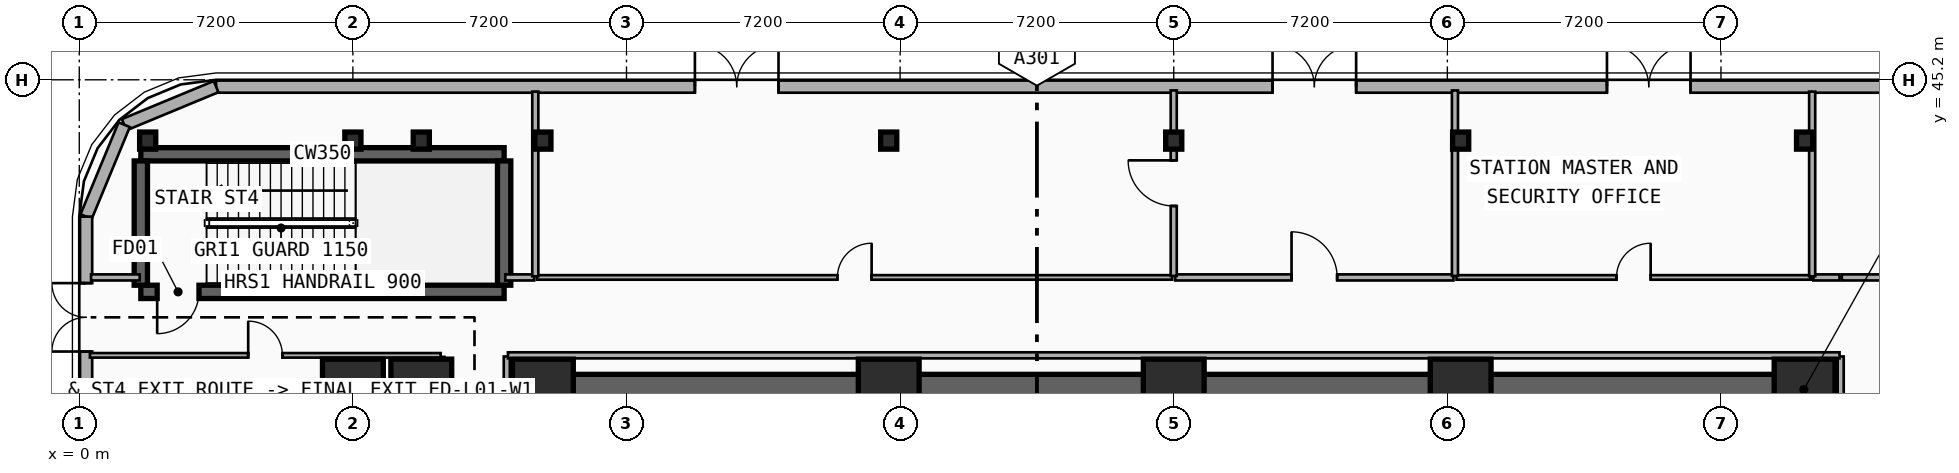
"""IFC4 building model, lengths in metres.
Left out: names, types, materials, properties, quantities, classifications, styles, units other than length and angle.
Written with IfcOpenShell. Run it as: python <this file> out.ifc"""

import sys

from ifc_helpers import new_model, si_unit, direction, frame, frame_2d, origin, origin_2d, place, context, subcontext, project, spatial, rectangle, i_section, extrude, element, fill, save


model = new_model("IFC4")
c1 = context("Model", 3, precision=1e-05, world=origin(), true_north=direction((0.0, 1.0)))
c2 = subcontext(c1, "Body", "Model", "MODEL_VIEW")
j1 = project(units=[si_unit("LENGTHUNIT", "METRE"), si_unit("PLANEANGLEUNIT", "RADIAN")], contexts=[c1])
p1 = place(None, origin())
s1 = spatial("IfcSite", under=j1, at=p1, CompositionType="ELEMENT")
p2 = place(p1, origin())
s2 = spatial("IfcBuilding", under=s1, at=p2, CompositionType="ELEMENT")
p3 = place(p2, origin())
s3 = spatial("IfcBuildingStorey", under=s2, at=p3, CompositionType="ELEMENT", Elevation=0.0)
p4 = place(p3, frame((12.15, 37.05, 0.0), z_axis=(0.0, 0.0, 1.0), x_axis=(1.0, 0.0, 0.0)))
e1 = element("IfcWall", 1, at=p4, inside=s3, PredefinedType="SHEAR", context=c2, shape_type="SweptSolid", body=[
    extrude(rectangle(XDim=33.23, YDim=0.8, at=frame_2d((16.615, 0.0))), origin(), (0.0, 0.0, 1.0), 5.4),
])
p5 = place(p3, frame((1.62, 43.24, 0.0), z_axis=(0.0, 0.0, 1.0), x_axis=(1.0, 0.0, 0.0)))
e2 = element("IfcWall", 2, at=p5, inside=s3, PredefinedType="SHEAR", context=c2, shape_type="SweptSolid", body=[
    extrude(rectangle(XDim=9.56, YDim=0.35, at=frame_2d((4.78, 0.0))), origin(), (0.0, 0.0, 1.0), 5.4),
])
p6 = place(p3, frame((11.18, 39.62, 0.0), z_axis=(0.0, 0.0, 1.0), x_axis=(-1.0, 0.0, 0.0)))
e3 = element("IfcWall", 3, at=p6, inside=s3, PredefinedType="SHEAR", context=c2, shape_type="SweptSolid", body=[
    extrude(rectangle(XDim=9.56, YDim=0.35, at=frame_2d((4.78, 0.0))), origin(), (0.0, 0.0, 1.0), 5.4),
])
p7 = place(p6, frame((8.03, 0.0, 0.0)))
e4 = element("IfcOpeningElement", 4, at=p7, cuts=e3, PredefinedType="OPENING", context=c2, shape_type="SweptSolid", body=[
    extrude(rectangle(XDim=1.1, YDim=2.15, at=frame_2d((0.55, 1.075))), frame((0.0, 0.185, 0.0), z_axis=(0.0, -1.0, 0.0), x_axis=(1.0, 0.0, 0.0)), (0.0, 0.0, 1.0), 0.37),
])
for number, where, z_axis, x_axis in (
    (5, (1.62, 39.795, 0.0), (0.0, 0.0, 1.0), (0.0, 1.0, 0.0)),
    (6, (11.18, 39.795, 0.0), (0.0, 0.0, 1.0), (0.0, 1.0, 0.0)),
):
    element("IfcWall", number, at=place(p3, frame(where, z_axis=z_axis, x_axis=x_axis)), inside=s3, PredefinedType="SHEAR", context=c2, shape_type="SweptSolid", body=[
        extrude(rectangle(XDim=3.27, YDim=0.35, at=frame_2d((1.635, 0.0))), origin(), (0.0, 0.0, 1.0), 5.4),
    ])
for number, where, z_axis, x_axis in (
    (7, (12.2, 37.05, 0.0), (0.0, 0.0, 1.0), (1.0, 0.0, 0.0)),
    (8, (21.3, 37.05, 0.0), (0.0, 0.0, 1.0), (1.0, 0.0, 0.0)),
    (9, (28.8, 37.05, 0.0), (0.0, 0.0, 1.0), (1.0, 0.0, 0.0)),
    (10, (36.35, 37.05, 0.0), (0.0, 0.0, 1.0), (1.0, 0.0, 0.0)),
    (11, (45.4, 37.05, 0.0), (0.0, 0.0, 1.0), (1.0, 0.0, 0.0)),
):
    element("IfcColumn", number, at=place(p3, frame(where, z_axis=z_axis, x_axis=x_axis)), inside=s3, PredefinedType="COLUMN", context=c2, shape_type="SweptSolid", body=[
        extrude(rectangle(XDim=1.6, YDim=1.6, at=origin_2d()), origin(), (0.0, 0.0, 1.0), 5.4),
    ])
for number, where, z_axis, x_axis in (
    (12, (1.8, 37.05, 0.0), (0.0, 0.0, 1.0), (1.0, 0.0, 0.0)),
    (13, (1.8, 43.6, 0.0), (0.0, 0.0, 1.0), (1.0, 0.0, 0.0)),
):
    element("IfcColumn", number, at=place(p3, frame(where, z_axis=z_axis, x_axis=x_axis)), inside=s3, PredefinedType="COLUMN", context=c2, shape_type="SweptSolid", body=[
        extrude(i_section(OverallWidth=0.424, OverallDepth=0.45, WebThickness=0.041, FlangeThickness=0.065, FilletRadius=0.015, at=origin_2d()), origin(), (0.0, 0.0, 1.0), 5.4),
    ])
p8 = place(p3, frame((7.2, 37.05, 0.0), z_axis=(0.0, 0.0, 1.0), x_axis=(1.0, 0.0, 0.0)))
e14 = element("IfcColumn", 14, at=p8, inside=s3, PredefinedType="COLUMN", context=c2, shape_type="SweptSolid", body=[
    extrude(rectangle(XDim=1.6, YDim=1.6, at=origin_2d()), origin(), (0.0, 0.0, 1.0), 5.4),
])
p9 = place(p3, frame((7.2, 43.6, 0.0), z_axis=(0.0, 0.0, 1.0), x_axis=(1.0, 0.0, 0.0)))
e15 = element("IfcColumn", 15, at=p9, inside=s3, PredefinedType="COLUMN", context=c2, shape_type="SweptSolid", body=[
    extrude(i_section(OverallWidth=0.424, OverallDepth=0.45, WebThickness=0.041, FlangeThickness=0.065, FilletRadius=0.015, at=origin_2d()), origin(), (0.0, 0.0, 1.0), 5.4),
])
p10 = place(p3, frame((9.0, 37.05, 0.0), z_axis=(0.0, 0.0, 1.0), x_axis=(1.0, 0.0, 0.0)))
e16 = element("IfcColumn", 16, at=p10, inside=s3, PredefinedType="COLUMN", context=c2, shape_type="SweptSolid", body=[
    extrude(rectangle(XDim=1.6, YDim=1.6, at=origin_2d()), origin(), (0.0, 0.0, 1.0), 5.4),
])
for number, where, z_axis, x_axis in (
    (17, (9.0, 43.6, 0.0), (0.0, 0.0, 1.0), (1.0, 0.0, 0.0)),
    (18, (12.2, 43.6, 0.0), (0.0, 0.0, 1.0), (1.0, 0.0, 0.0)),
    (19, (21.3, 43.6, 0.0), (0.0, 0.0, 1.0), (1.0, 0.0, 0.0)),
    (20, (28.8, 43.6, 0.0), (0.0, 0.0, 1.0), (1.0, 0.0, 0.0)),
    (21, (36.35, 43.6, 0.0), (0.0, 0.0, 1.0), (1.0, 0.0, 0.0)),
    (22, (45.4, 43.6, 0.0), (0.0, 0.0, 1.0), (1.0, 0.0, 0.0)),
):
    element("IfcColumn", number, at=place(p3, frame(where, z_axis=z_axis, x_axis=x_axis)), inside=s3, PredefinedType="COLUMN", context=c2, shape_type="SweptSolid", body=[
        extrude(i_section(OverallWidth=0.424, OverallDepth=0.45, WebThickness=0.041, FlangeThickness=0.065, FilletRadius=0.015, at=origin_2d()), origin(), (0.0, 0.0, 1.0), 5.4),
    ])
p11 = place(p3, frame((3.6, 45.02, 0.0), z_axis=(0.0, 0.0, 1.0), x_axis=(1.0, 0.0, 0.0)))
e23 = element("IfcWall", 23, at=p11, inside=s3, PredefinedType="SOLIDWALL", context=c2, shape_type="SweptSolid", body=[
    extrude(rectangle(XDim=50.4, YDim=0.32, at=frame_2d((25.2, 0.0))), origin(), (0.0, 0.0, 1.0), 5.1),
])
p12 = place(p11, frame((12.6, 0.0, 0.0)))
e24 = element("IfcOpeningElement", 24, at=p12, cuts=e23, PredefinedType="OPENING", context=c2, shape_type="SweptSolid", body=[
    extrude(rectangle(XDim=2.2, YDim=2.4, at=frame_2d((1.1, 1.2))), frame((0.0, 0.17, 0.0), z_axis=(0.0, -1.0, 0.0), x_axis=(1.0, 0.0, 0.0)), (0.0, 0.0, 1.0), 0.34),
])
p13 = place(p11, frame((27.8, 0.0, 0.0)))
e25 = element("IfcOpeningElement", 25, at=p13, cuts=e23, PredefinedType="OPENING", context=c2, shape_type="SweptSolid", body=[
    extrude(rectangle(XDim=2.2, YDim=2.4, at=frame_2d((1.1, 1.2))), frame((0.0, 0.17, 0.0), z_axis=(0.0, -1.0, 0.0), x_axis=(1.0, 0.0, 0.0)), (0.0, 0.0, 1.0), 0.34),
])
p14 = place(p11, frame((36.6, 0.0, 0.0)))
e26 = element("IfcOpeningElement", 26, at=p14, cuts=e23, PredefinedType="OPENING", context=c2, shape_type="SweptSolid", body=[
    extrude(rectangle(XDim=2.2, YDim=2.4, at=frame_2d((1.1, 1.2))), frame((0.0, 0.17, 0.0), z_axis=(0.0, -1.0, 0.0), x_axis=(1.0, 0.0, 0.0)), (0.0, 0.0, 1.0), 0.34),
])
p15 = place(p3, frame((1.182, 44.018, 0.0), z_axis=(0.0, 0.0, 1.0), x_axis=(0.923886112352, 0.382667546838, 0.0)))
e27 = element("IfcWall", 27, at=p15, inside=s3, PredefinedType="SOLIDWALL", context=c2, shape_type="SweptSolid", body=[
    extrude(rectangle(XDim=2.618, YDim=0.32, at=frame_2d((1.309, 0.0))), origin(), (0.0, 0.0, 1.0), 5.1),
])
p16 = place(p3, frame((0.18, 41.6, 0.0), z_axis=(0.0, 0.0, 1.0), x_axis=(0.382700522567, 0.923872453333, 0.0)))
e28 = element("IfcWall", 28, at=p16, inside=s3, PredefinedType="SOLIDWALL", context=c2, shape_type="SweptSolid", body=[
    extrude(rectangle(XDim=2.617, YDim=0.32, at=frame_2d((1.309, 0.0))), origin(), (0.0, 0.0, 1.0), 5.1),
])
p17 = place(p3, frame((0.18, 7.2, 0.0), z_axis=(0.0, 0.0, 1.0), x_axis=(0.0, 1.0, 0.0)))
e29 = element("IfcWall", 29, at=p17, inside=s3, PredefinedType="SOLIDWALL", context=c2, shape_type="SweptSolid", body=[
    extrude(rectangle(XDim=34.4, YDim=0.32, at=frame_2d((17.2, 0.0))), origin(), (0.0, 0.0, 1.0), 5.1),
])
p18 = place(p17, frame((4.0, 0.0, 0.0)))
e30 = element("IfcOpeningElement", 30, at=p18, cuts=e29, PredefinedType="OPENING", context=c2, shape_type="SweptSolid", body=[
    extrude(rectangle(XDim=5.8, YDim=2.8, at=frame_2d((2.9, 1.4))), frame((0.0, 0.17, 0.0), z_axis=(0.0, -1.0, 0.0), x_axis=(1.0, 0.0, 0.0)), (0.0, 0.0, 1.0), 0.34),
])
p19 = place(p17, frame((30.85, 0.0, 0.0)))
e31 = element("IfcOpeningElement", 31, at=p19, cuts=e29, PredefinedType="OPENING", context=c2, shape_type="SweptSolid", body=[
    extrude(rectangle(XDim=1.8, YDim=2.3, at=frame_2d((0.9, 1.15))), frame((0.0, 0.17, 0.0), z_axis=(0.0, -1.0, 0.0), x_axis=(1.0, 0.0, 0.0)), (0.0, 0.0, 1.0), 0.34),
])
p20 = place(p17, frame((24.3, 0.0, 0.0)))
e32 = element("IfcOpeningElement", 32, at=p20, cuts=e29, PredefinedType="OPENING", context=c2, shape_type="SweptSolid", body=[
    extrude(rectangle(XDim=2.2, YDim=2.4, at=frame_2d((1.1, 1.2))), frame((0.0, 0.17, 0.0), z_axis=(0.0, -1.0, 0.0), x_axis=(1.0, 0.0, 0.0)), (0.0, 0.0, 1.0), 0.34),
])
p21 = place(p3, frame((9.55, 27.64, 0.0), z_axis=(0.0, 0.0, 1.0), x_axis=(0.0, 1.0, 0.0)))
e33 = element("IfcWall", 33, at=p21, inside=s3, PredefinedType="PARTITIONING", context=c2, shape_type="SweptSolid", body=[
    extrude(rectangle(XDim=10.27, YDim=0.12, at=frame_2d((5.135, 0.0))), origin(), (0.0, 0.0, 1.0), 5.1),
])
p22 = place(p21, frame((4.685, 0.0, 0.0)))
e34 = element("IfcOpeningElement", 34, at=p22, cuts=e33, PredefinedType="OPENING", context=c2, shape_type="SweptSolid", body=[
    extrude(rectangle(XDim=0.9, YDim=2.1, at=frame_2d((0.45, 1.05))), frame((0.0, 0.07, 0.0), z_axis=(0.0, -1.0, 0.0), x_axis=(1.0, 0.0, 0.0)), (0.0, 0.0, 1.0), 0.14),
])
p23 = place(p3, frame((0.28, 37.95, 0.0), z_axis=(0.0, 0.0, 1.0), x_axis=(1.0, 0.0, 0.0)))
e35 = element("IfcWall", 35, at=p23, inside=s3, PredefinedType="PARTITIONING", context=c2, shape_type="SweptSolid", body=[
    extrude(rectangle(XDim=9.23, YDim=0.12, at=frame_2d((4.615, 0.0))), origin(), (0.0, 0.0, 1.0), 5.1),
])
p24 = place(p23, frame((4.165, 0.0, 0.0)))
e36 = element("IfcOpeningElement", 36, at=p24, cuts=e35, PredefinedType="OPENING", context=c2, shape_type="SweptSolid", body=[
    extrude(rectangle(XDim=0.9, YDim=2.1, at=frame_2d((0.45, 1.05))), frame((0.0, 0.07, 0.0), z_axis=(0.0, -1.0, 0.0), x_axis=(1.0, 0.0, 0.0)), (0.0, 0.0, 1.0), 0.14),
])
p25 = place(p3, frame((12.04, 40.0, 0.0), z_axis=(0.0, 0.0, 1.0), x_axis=(1.0, 0.0, 0.0)))
e37 = element("IfcWall", 37, at=p25, inside=s3, PredefinedType="PARTITIONING", context=c2, shape_type="SweptSolid", body=[
    extrude(rectangle(XDim=16.72, YDim=0.12, at=frame_2d((8.36, 0.0))), origin(), (0.0, 0.0, 1.0), 4.43),
])
p26 = place(p25, frame((7.91, 0.0, 0.0)))
e38 = element("IfcOpeningElement", 38, at=p26, cuts=e37, PredefinedType="OPENING", context=c2, shape_type="SweptSolid", body=[
    extrude(rectangle(XDim=0.9, YDim=2.1, at=frame_2d((0.45, 1.05))), frame((0.0, 0.07, 0.0), z_axis=(0.0, -1.0, 0.0), x_axis=(1.0, 0.0, 0.0)), (0.0, 0.0, 1.0), 0.14),
])
p27 = place(p3, frame((28.84, 40.0, 0.0), z_axis=(0.0, 0.0, 1.0), x_axis=(1.0, 0.0, 0.0)))
e39 = element("IfcWall", 39, at=p27, inside=s3, PredefinedType="PARTITIONING", context=c2, shape_type="SweptSolid", body=[
    extrude(rectangle(XDim=7.32, YDim=0.16, at=frame_2d((3.66, 0.0))), origin(), (0.0, 0.0, 1.0), 4.43),
])
p28 = place(p27, frame((3.06, 0.0, 0.0)))
e40 = element("IfcOpeningElement", 40, at=p28, cuts=e39, PredefinedType="OPENING", context=c2, shape_type="SweptSolid", body=[
    extrude(rectangle(XDim=1.2, YDim=2.15, at=frame_2d((0.6, 1.075))), frame((0.0, 0.09, 0.0), z_axis=(0.0, -1.0, 0.0), x_axis=(1.0, 0.0, 0.0)), (0.0, 0.0, 1.0), 0.18),
])
p29 = place(p3, frame((36.24, 40.0, 0.0), z_axis=(0.0, 0.0, 1.0), x_axis=(1.0, 0.0, 0.0)))
e41 = element("IfcWall", 41, at=p29, inside=s3, PredefinedType="PARTITIONING", context=c2, shape_type="SweptSolid", body=[
    extrude(rectangle(XDim=9.32, YDim=0.12, at=frame_2d((4.66, 0.0))), origin(), (0.0, 0.0, 1.0), 4.43),
])
p30 = place(p29, frame((4.21, 0.0, 0.0)))
e42 = element("IfcOpeningElement", 42, at=p30, cuts=e41, PredefinedType="OPENING", context=c2, shape_type="SweptSolid", body=[
    extrude(rectangle(XDim=0.9, YDim=2.1, at=frame_2d((0.45, 1.05))), frame((0.0, 0.07, 0.0), z_axis=(0.0, -1.0, 0.0), x_axis=(1.0, 0.0, 0.0)), (0.0, 0.0, 1.0), 0.14),
])
p31 = place(p3, frame((28.8, 40.04, 0.0), z_axis=(0.0, 0.0, 1.0), x_axis=(0.0, 1.0, 0.0)))
e43 = element("IfcWall", 43, at=p31, inside=s3, PredefinedType="PARTITIONING", context=c2, shape_type="SweptSolid", body=[
    extrude(rectangle(XDim=4.88, YDim=0.16, at=frame_2d((2.44, 0.0))), origin(), (0.0, 0.0, 1.0), 4.43),
])
p32 = place(p31, frame((1.84, 0.0, 0.0)))
e44 = element("IfcOpeningElement", 44, at=p32, cuts=e43, PredefinedType="OPENING", context=c2, shape_type="SweptSolid", body=[
    extrude(rectangle(XDim=1.2, YDim=2.15, at=frame_2d((0.6, 1.075))), frame((0.0, 0.09, 0.0), z_axis=(0.0, -1.0, 0.0), x_axis=(1.0, 0.0, 0.0)), (0.0, 0.0, 1.0), 0.18),
])
p33 = place(p3, frame((36.2, 40.04, 0.0), z_axis=(0.0, 0.0, 1.0), x_axis=(0.0, 1.0, 0.0)))
e45 = element("IfcWall", 45, at=p33, inside=s3, PredefinedType="PARTITIONING", context=c2, shape_type="SweptSolid", body=[
    extrude(rectangle(XDim=4.88, YDim=0.16, at=frame_2d((2.44, 0.0))), origin(), (0.0, 0.0, 1.0), 4.43),
])
p34 = place(p3, frame((11.25, 27.63, 0.0), z_axis=(0.0, 0.0, 1.0), x_axis=(0.0, 1.0, 0.0)))
e46 = element("IfcWall", 46, at=p34, inside=s3, PredefinedType="PARTITIONING", context=c2, shape_type="SweptSolid", body=[
    extrude(rectangle(XDim=10.29, YDim=0.16, at=frame_2d((5.145, 0.0))), origin(), (0.0, 0.0, 1.0), 5.1),
])
p35 = place(p3, frame((46.38, 40.0, 0.0), z_axis=(0.0, 0.0, 1.0), x_axis=(1.0, 0.0, 0.0)))
e47 = element("IfcWall", 47, at=p35, inside=s3, PredefinedType="PARTITIONING", context=c2, shape_type="SweptSolid", body=[
    extrude(rectangle(XDim=1.64, YDim=0.16, at=frame_2d((0.82, 0.0))), origin(), (0.0, 0.0, 1.0), 5.1),
])
p36 = place(p3, frame((46.35, 27.63, 0.0), z_axis=(0.0, 0.0, 1.0), x_axis=(0.0, 1.0, 0.0)))
e48 = element("IfcWall", 48, at=p36, inside=s3, PredefinedType="PARTITIONING", context=c2, shape_type="SweptSolid", body=[
    extrude(rectangle(XDim=10.29, YDim=0.16, at=frame_2d((5.145, 0.0))), origin(), (0.0, 0.0, 1.0), 5.1),
])
p37 = place(p3, frame((11.28, 37.95, 0.0), z_axis=(0.0, 0.0, 1.0), x_axis=(1.0, 0.0, 0.0)))
e49 = element("IfcWall", 49, at=p37, inside=s3, PredefinedType="PARTITIONING", context=c2, shape_type="SweptSolid", body=[
    extrude(rectangle(XDim=35.04, YDim=0.16, at=frame_2d((17.52, 0.0))), origin(), (0.0, 0.0, 1.0), 4.43),
])
p38 = place(p3, frame((0.31, 40.0, 0.0), z_axis=(0.0, 0.0, 1.0), x_axis=(1.0, 0.0, 0.0)))
e50 = element("IfcWall", 50, at=p38, inside=s3, PredefinedType="PARTITIONING", context=c2, shape_type="SweptSolid", body=[
    extrude(rectangle(XDim=1.28, YDim=0.16, at=frame_2d((0.64, 0.0))), origin(), (0.0, 0.0, 1.0), 5.1),
])
p39 = place(p3, frame((11.21, 40.0, 0.0), z_axis=(0.0, 0.0, 1.0), x_axis=(1.0, 0.0, 0.0)))
e51 = element("IfcWall", 51, at=p39, inside=s3, PredefinedType="PARTITIONING", context=c2, shape_type="SweptSolid", body=[
    extrude(rectangle(XDim=0.76, YDim=0.16, at=frame_2d((0.38, 0.0))), origin(), (0.0, 0.0, 1.0), 4.43),
])
p40 = place(p3, frame((45.63, 40.0, 0.0), z_axis=(0.0, 0.0, 1.0), x_axis=(1.0, 0.0, 0.0)))
e52 = element("IfcWall", 52, at=p40, inside=s3, PredefinedType="PARTITIONING", context=c2, shape_type="SweptSolid", body=[
    extrude(rectangle(XDim=0.69, YDim=0.16, at=frame_2d((0.345, 0.0))), origin(), (0.0, 0.0, 1.0), 4.43),
])
for number, where, z_axis, x_axis in (
    (53, (12.0, 40.03, 0.0), (0.0, 0.0, 1.0), (0.0, 1.0, 0.0)),
    (54, (45.6, 40.03, 0.0), (0.0, 0.0, 1.0), (0.0, 1.0, 0.0)),
):
    element("IfcWall", number, at=place(p3, frame(where, z_axis=z_axis, x_axis=x_axis)), inside=s3, PredefinedType="PARTITIONING", context=c2, shape_type="SweptSolid", body=[
        extrude(rectangle(XDim=4.86, YDim=0.16, at=frame_2d((2.43, 0.0))), origin(), (0.0, 0.0, 1.0), 4.43),
    ])
p41 = place(p12, origin())
e55 = element("IfcDoor", 55, at=p41, inside=s3, OperationType="SINGLE_SWING_LEFT", PredefinedType="DOOR", context=c2, shape_type="SweptSolid", body=[
    extrude(rectangle(XDim=2.2, YDim=2.4, at=frame_2d((1.1, 1.2))), frame((0.0, 0.025, 0.0), z_axis=(0.0, -1.0, 0.0), x_axis=(1.0, 0.0, 0.0)), (0.0, 0.0, 1.0), 0.05),
])
fill(e24, e55)
p42 = place(p13, origin())
e56 = element("IfcDoor", 56, at=p42, inside=s3, OperationType="SINGLE_SWING_LEFT", PredefinedType="DOOR", context=c2, shape_type="SweptSolid", body=[
    extrude(rectangle(XDim=2.2, YDim=2.4, at=frame_2d((1.1, 1.2))), frame((0.0, 0.025, 0.0), z_axis=(0.0, -1.0, 0.0), x_axis=(1.0, 0.0, 0.0)), (0.0, 0.0, 1.0), 0.05),
])
fill(e25, e56)
p43 = place(p14, origin())
e57 = element("IfcDoor", 57, at=p43, inside=s3, OperationType="SINGLE_SWING_LEFT", PredefinedType="DOOR", context=c2, shape_type="SweptSolid", body=[
    extrude(rectangle(XDim=2.2, YDim=2.4, at=frame_2d((1.1, 1.2))), frame((0.0, 0.025, 0.0), z_axis=(0.0, -1.0, 0.0), x_axis=(1.0, 0.0, 0.0)), (0.0, 0.0, 1.0), 0.05),
])
fill(e26, e57)
p44 = place(p19, origin())
e58 = element("IfcDoor", 58, at=p44, inside=s3, OperationType="SINGLE_SWING_LEFT", PredefinedType="DOOR", context=c2, shape_type="SweptSolid", body=[
    extrude(rectangle(XDim=1.8, YDim=2.3, at=frame_2d((0.9, 1.15))), frame((0.0, 0.025, 0.0), z_axis=(0.0, -1.0, 0.0), x_axis=(1.0, 0.0, 0.0)), (0.0, 0.0, 1.0), 0.05),
])
fill(e31, e58)
p45 = place(p7, origin())
e59 = element("IfcDoor", 59, at=p45, inside=s3, OperationType="SINGLE_SWING_RIGHT", PredefinedType="DOOR", context=c2, shape_type="SweptSolid", body=[
    extrude(rectangle(XDim=1.1, YDim=2.15, at=frame_2d((0.55, 1.075))), frame((0.0, 0.025, 0.0), z_axis=(0.0, -1.0, 0.0), x_axis=(1.0, 0.0, 0.0)), (0.0, 0.0, 1.0), 0.05),
])
fill(e4, e59)
p46 = place(p24, origin())
e60 = element("IfcDoor", 60, at=p46, inside=s3, OperationType="SINGLE_SWING_LEFT", PredefinedType="DOOR", context=c2, shape_type="SweptSolid", body=[
    extrude(rectangle(XDim=0.9, YDim=2.1, at=frame_2d((0.45, 1.05))), frame((0.0, 0.025, 0.0), z_axis=(0.0, -1.0, 0.0), x_axis=(1.0, 0.0, 0.0)), (0.0, 0.0, 1.0), 0.05),
])
fill(e36, e60)
p47 = place(p26, origin())
e61 = element("IfcDoor", 61, at=p47, inside=s3, OperationType="SINGLE_SWING_RIGHT", PredefinedType="DOOR", context=c2, shape_type="SweptSolid", body=[
    extrude(rectangle(XDim=0.9, YDim=2.1, at=frame_2d((0.45, 1.05))), frame((0.0, 0.025, 0.0), z_axis=(0.0, -1.0, 0.0), x_axis=(1.0, 0.0, 0.0)), (0.0, 0.0, 1.0), 0.05),
])
fill(e38, e61)
p48 = place(p28, origin())
e62 = element("IfcDoor", 62, at=p48, inside=s3, OperationType="SINGLE_SWING_LEFT", PredefinedType="DOOR", context=c2, shape_type="SweptSolid", body=[
    extrude(rectangle(XDim=1.2, YDim=2.15, at=frame_2d((0.6, 1.075))), frame((0.0, 0.025, 0.0), z_axis=(0.0, -1.0, 0.0), x_axis=(1.0, 0.0, 0.0)), (0.0, 0.0, 1.0), 0.05),
])
fill(e40, e62)
p49 = place(p30, origin())
e63 = element("IfcDoor", 63, at=p49, inside=s3, OperationType="SINGLE_SWING_RIGHT", PredefinedType="DOOR", context=c2, shape_type="SweptSolid", body=[
    extrude(rectangle(XDim=0.9, YDim=2.1, at=frame_2d((0.45, 1.05))), frame((0.0, 0.025, 0.0), z_axis=(0.0, -1.0, 0.0), x_axis=(1.0, 0.0, 0.0)), (0.0, 0.0, 1.0), 0.05),
])
fill(e42, e63)
p50 = place(p32, origin())
e64 = element("IfcDoor", 64, at=p50, inside=s3, OperationType="SINGLE_SWING_RIGHT", PredefinedType="DOOR", context=c2, shape_type="SweptSolid", body=[
    extrude(rectangle(XDim=1.2, YDim=2.15, at=frame_2d((0.6, 1.075))), frame((0.0, 0.025, 0.0), z_axis=(0.0, -1.0, 0.0), x_axis=(1.0, 0.0, 0.0)), (0.0, 0.0, 1.0), 0.05),
])
fill(e44, e64)
save(model, sys.argv[1])
